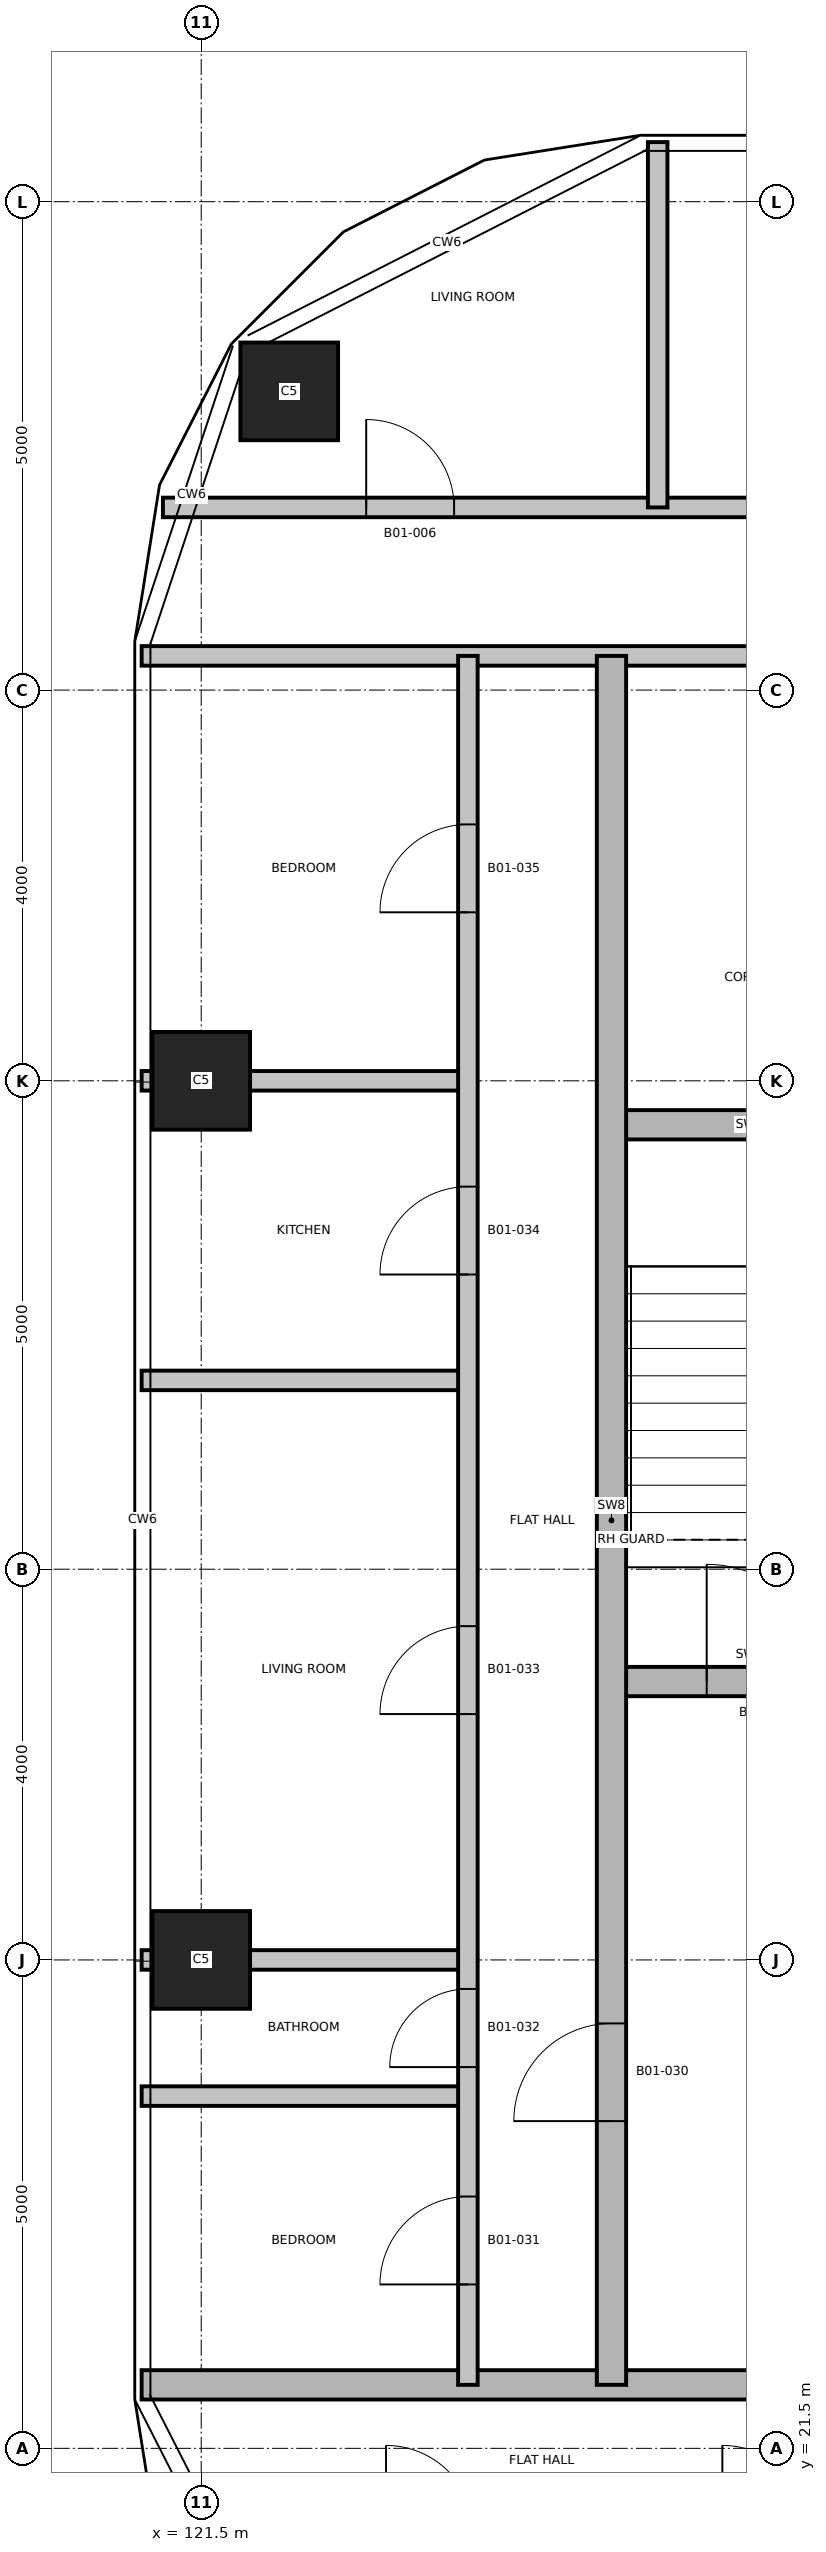
"""IFC4 building model, lengths in metres.
Left out: names, types, materials, properties, quantities, classifications, styles, units other than length and angle.
Written with IfcOpenShell. Run it as: python <this file> out.ifc"""

import sys

from ifc_helpers import new_model, si_unit, direction, frame, frame_2d, origin, origin_2d, place, context, subcontext, project, spatial, rectangle, extrude, element, fill, save


model = new_model("IFC4")
c1 = context("Model", 3, precision=1e-05, world=origin(), true_north=direction((0.0, 1.0)))
c2 = subcontext(c1, "Body", "Model", "MODEL_VIEW")
j1 = project(units=[si_unit("LENGTHUNIT", "METRE"), si_unit("PLANEANGLEUNIT", "RADIAN")], contexts=[c1])
p1 = place(None, origin())
s1 = spatial("IfcSite", under=j1, at=p1, CompositionType="ELEMENT")
p2 = place(p1, origin())
s2 = spatial("IfcBuilding", under=s1, at=p2, CompositionType="ELEMENT")
p3 = place(p2, frame((0.0, 0.0, 37.2)))
s3 = spatial("IfcBuildingStorey", under=s2, at=p3, CompositionType="ELEMENT", Elevation=37.2)
for number, where, z_axis, x_axis in (
    (1, (121.5, 26.5, 0.0), (0.0, 0.0, 1.0), (1.0, 0.0, 0.0)),
    (2, (121.5, 35.5, 0.0), (0.0, 0.0, 1.0), (1.0, 0.0, 0.0)),
    (3, (122.401, 42.558, 0.0), (0.0, 0.0, 1.0), (1.0, 0.0, 0.0)),
):
    element("IfcColumn", number, at=place(p3, frame(where, z_axis=z_axis, x_axis=x_axis)), inside=s3, PredefinedType="COLUMN", context=c2, shape_type="SweptSolid", body=[
        extrude(rectangle(XDim=1.0, YDim=1.0, at=origin_2d()), origin(), (0.0, 0.0, 1.0), 3.7),
    ])
p4 = place(p3, frame((120.89, 22.15, 0.0), z_axis=(0.0, 0.0, 1.0), x_axis=(1.0, 0.0, 0.0)))
e4 = element("IfcWall", 4, at=p4, inside=s3, PredefinedType="SHEAR", context=c2, shape_type="SweptSolid", body=[
    extrude(rectangle(XDim=31.22, YDim=0.3, at=frame_2d((15.61, 0.0))), origin(), (0.0, 0.0, 1.0), 3.4),
])
p5 = place(p4, frame((21.86, 0.0, 0.0)))
e5 = element("IfcOpeningElement", 5, at=p5, cuts=e4, PredefinedType="OPENING", context=c2, shape_type="SweptSolid", body=[
    extrude(rectangle(XDim=1.0, YDim=2.1, at=frame_2d((0.5, 1.05))), frame((0.0, 0.16, 0.0), z_axis=(0.0, -1.0, 0.0), x_axis=(1.0, 0.0, 0.0)), (0.0, 0.0, 1.0), 0.32),
])
p6 = place(p4, frame((6.46, 0.0, 0.0)))
e6 = element("IfcOpeningElement", 6, at=p6, cuts=e4, PredefinedType="OPENING", context=c2, shape_type="SweptSolid", body=[
    extrude(rectangle(XDim=1.0, YDim=2.1, at=frame_2d((0.5, 1.05))), frame((0.0, 0.16, 0.0), z_axis=(0.0, -1.0, 0.0), x_axis=(1.0, 0.0, 0.0)), (0.0, 0.0, 1.0), 0.32),
])
p7 = place(p4, frame((11.36, 0.0, 0.0)))
e7 = element("IfcOpeningElement", 7, at=p7, cuts=e4, PredefinedType="OPENING", context=c2, shape_type="SweptSolid", body=[
    extrude(rectangle(XDim=1.0, YDim=2.1, at=frame_2d((0.5, 1.05))), frame((0.0, 0.16, 0.0), z_axis=(0.0, -1.0, 0.0), x_axis=(1.0, 0.0, 0.0)), (0.0, 0.0, 1.0), 0.32),
])
p8 = place(p4, frame((23.76, 0.0, 0.0)))
e8 = element("IfcOpeningElement", 8, at=p8, cuts=e4, PredefinedType="OPENING", context=c2, shape_type="SweptSolid", body=[
    extrude(rectangle(XDim=1.0, YDim=2.1, at=frame_2d((0.5, 1.05))), frame((0.0, 0.16, 0.0), z_axis=(0.0, -1.0, 0.0), x_axis=(1.0, 0.0, 0.0)), (0.0, 0.0, 1.0), 0.32),
])
p9 = place(p4, frame((15.86, 0.0, 0.0)))
e9 = element("IfcOpeningElement", 9, at=p9, cuts=e4, PredefinedType="OPENING", context=c2, shape_type="SweptSolid", body=[
    extrude(rectangle(XDim=0.9, YDim=2.1, at=frame_2d((0.45, 1.05))), frame((0.0, 0.16, 0.0), z_axis=(0.0, -1.0, 0.0), x_axis=(1.0, 0.0, 0.0)), (0.0, 0.0, 1.0), 0.32),
])
for number, where, z_axis, x_axis in (
    (10, (120.89, 25.106, 0.0), (0.0, 0.0, 1.0), (1.0, 0.0, 0.0)),
    (11, (120.89, 26.5, 0.0), (0.0, 0.0, 1.0), (1.0, 0.0, 0.0)),
):
    element("IfcWall", number, at=place(p3, frame(where, z_axis=z_axis, x_axis=x_axis)), inside=s3, PredefinedType="PARTITIONING", context=c2, shape_type="SweptSolid", body=[
        extrude(rectangle(XDim=3.34, YDim=0.2, at=frame_2d((1.67, 0.0))), origin(), (0.0, 0.0, 1.0), 3.4),
    ])
p10 = place(p3, frame((125.7, 29.35, 0.0), z_axis=(0.0, 0.0, 1.0), x_axis=(1.0, 0.0, 0.0)))
e12 = element("IfcWall", 12, at=p10, inside=s3, PredefinedType="SHEAR", context=c2, shape_type="SweptSolid", body=[
    extrude(rectangle(XDim=2.83, YDim=0.3, at=frame_2d((1.415, 0.0))), origin(), (0.0, 0.0, 1.0), 3.4),
])
p11 = place(p10, frame((0.975, 0.0, 0.0)))
e13 = element("IfcOpeningElement", 13, at=p11, cuts=e12, PredefinedType="OPENING", context=c2, shape_type="SweptSolid", body=[
    extrude(rectangle(XDim=1.2, YDim=2.1, at=frame_2d((0.6, 1.05))), frame((0.0, 0.16, 0.0), z_axis=(0.0, -1.0, 0.0), x_axis=(1.0, 0.0, 0.0)), (0.0, 0.0, 1.0), 0.32),
])
p12 = place(p3, frame((120.89, 32.433, 0.0), z_axis=(0.0, 0.0, 1.0), x_axis=(1.0, 0.0, 0.0)))
e14 = element("IfcWall", 14, at=p12, inside=s3, PredefinedType="PARTITIONING", context=c2, shape_type="SweptSolid", body=[
    extrude(rectangle(XDim=3.34, YDim=0.2, at=frame_2d((1.67, 0.0))), origin(), (0.0, 0.0, 1.0), 3.4),
])
p13 = place(p3, frame((125.7, 35.05, 0.0), z_axis=(0.0, 0.0, 1.0), x_axis=(1.0, 0.0, 0.0)))
e15 = element("IfcWall", 15, at=p13, inside=s3, PredefinedType="SHEAR", context=c2, shape_type="SweptSolid", body=[
    extrude(rectangle(XDim=2.83, YDim=0.3, at=frame_2d((1.415, 0.0))), origin(), (0.0, 0.0, 1.0), 3.4),
])
p14 = place(p3, frame((120.89, 35.5, 0.0), z_axis=(0.0, 0.0, 1.0), x_axis=(1.0, 0.0, 0.0)))
e16 = element("IfcWall", 16, at=p14, inside=s3, PredefinedType="PARTITIONING", context=c2, shape_type="SweptSolid", body=[
    extrude(rectangle(XDim=3.34, YDim=0.2, at=frame_2d((1.67, 0.0))), origin(), (0.0, 0.0, 1.0), 3.4),
])
p15 = place(p3, frame((120.89, 39.85, 0.0), z_axis=(0.0, 0.0, 1.0), x_axis=(1.0, 0.0, 0.0)))
e17 = element("IfcWall", 17, at=p15, inside=s3, PredefinedType="PARTITIONING", context=c2, shape_type="SweptSolid", body=[
    extrude(rectangle(XDim=31.22, YDim=0.2, at=frame_2d((15.61, 0.0))), origin(), (0.0, 0.0, 1.0), 3.4),
])
p16 = place(p15, frame((10.21, 0.0, 0.0)))
e18 = element("IfcOpeningElement", 18, at=p16, cuts=e17, PredefinedType="OPENING", context=c2, shape_type="SweptSolid", body=[
    extrude(rectangle(XDim=1.0, YDim=2.1, at=frame_2d((0.5, 1.05))), frame((0.0, 0.11, 0.0), z_axis=(0.0, -1.0, 0.0), x_axis=(1.0, 0.0, 0.0)), (0.0, 0.0, 1.0), 0.22),
])
p17 = place(p15, frame((20.01, 0.0, 0.0)))
e19 = element("IfcOpeningElement", 19, at=p17, cuts=e17, PredefinedType="OPENING", context=c2, shape_type="SweptSolid", body=[
    extrude(rectangle(XDim=1.0, YDim=2.1, at=frame_2d((0.5, 1.05))), frame((0.0, 0.11, 0.0), z_axis=(0.0, -1.0, 0.0), x_axis=(1.0, 0.0, 0.0)), (0.0, 0.0, 1.0), 0.22),
])
p18 = place(p3, frame((121.108, 41.37, 0.0), z_axis=(0.0, 0.0, 1.0), x_axis=(1.0, 0.0, 0.0)))
e20 = element("IfcWall", 20, at=p18, inside=s3, PredefinedType="PARTITIONING", context=c2, shape_type="SweptSolid", body=[
    extrude(rectangle(XDim=30.784, YDim=0.2, at=frame_2d((15.392, 0.0))), origin(), (0.0, 0.0, 1.0), 3.4),
])
p19 = place(p18, frame((2.081, 0.0, 0.0)))
e21 = element("IfcOpeningElement", 21, at=p19, cuts=e20, PredefinedType="OPENING", context=c2, shape_type="SweptSolid", body=[
    extrude(rectangle(XDim=0.9, YDim=2.1, at=frame_2d((0.45, 1.05))), frame((0.0, 0.11, 0.0), z_axis=(0.0, -1.0, 0.0), x_axis=(1.0, 0.0, 0.0)), (0.0, 0.0, 1.0), 0.22),
])
p20 = place(p18, frame((6.029, 0.0, 0.0)))
e22 = element("IfcOpeningElement", 22, at=p20, cuts=e20, PredefinedType="OPENING", context=c2, shape_type="SweptSolid", body=[
    extrude(rectangle(XDim=0.9, YDim=2.1, at=frame_2d((0.45, 1.05))), frame((0.0, 0.11, 0.0), z_axis=(0.0, -1.0, 0.0), x_axis=(1.0, 0.0, 0.0)), (0.0, 0.0, 1.0), 0.22),
])
p21 = place(p18, frame((9.976, 0.0, 0.0)))
e23 = element("IfcOpeningElement", 23, at=p21, cuts=e20, PredefinedType="OPENING", context=c2, shape_type="SweptSolid", body=[
    extrude(rectangle(XDim=0.9, YDim=2.1, at=frame_2d((0.45, 1.05))), frame((0.0, 0.11, 0.0), z_axis=(0.0, -1.0, 0.0), x_axis=(1.0, 0.0, 0.0)), (0.0, 0.0, 1.0), 0.22),
])
p22 = place(p18, frame((13.776, 0.0, 0.0)))
e24 = element("IfcOpeningElement", 24, at=p22, cuts=e20, PredefinedType="OPENING", context=c2, shape_type="SweptSolid", body=[
    extrude(rectangle(XDim=0.8, YDim=2.1, at=frame_2d((0.4, 1.05))), frame((0.0, 0.11, 0.0), z_axis=(0.0, -1.0, 0.0), x_axis=(1.0, 0.0, 0.0)), (0.0, 0.0, 1.0), 0.22),
])
p23 = place(p18, frame((17.409, 0.0, 0.0)))
e25 = element("IfcOpeningElement", 25, at=p23, cuts=e20, PredefinedType="OPENING", context=c2, shape_type="SweptSolid", body=[
    extrude(rectangle(XDim=0.9, YDim=2.1, at=frame_2d((0.45, 1.05))), frame((0.0, 0.11, 0.0), z_axis=(0.0, -1.0, 0.0), x_axis=(1.0, 0.0, 0.0)), (0.0, 0.0, 1.0), 0.22),
])
p24 = place(p18, frame((21.159, 0.0, 0.0)))
e26 = element("IfcOpeningElement", 26, at=p24, cuts=e20, PredefinedType="OPENING", context=c2, shape_type="SweptSolid", body=[
    extrude(rectangle(XDim=0.9, YDim=2.1, at=frame_2d((0.45, 1.05))), frame((0.0, 0.11, 0.0), z_axis=(0.0, -1.0, 0.0), x_axis=(1.0, 0.0, 0.0)), (0.0, 0.0, 1.0), 0.22),
])
p25 = place(p18, frame((23.219, 0.0, 0.0)))
e27 = element("IfcOpeningElement", 27, at=p25, cuts=e20, PredefinedType="OPENING", context=c2, shape_type="SweptSolid", body=[
    extrude(rectangle(XDim=0.8, YDim=2.1, at=frame_2d((0.4, 1.05))), frame((0.0, 0.11, 0.0), z_axis=(0.0, -1.0, 0.0), x_axis=(1.0, 0.0, 0.0)), (0.0, 0.0, 1.0), 0.22),
])
p26 = place(p18, frame((25.25, 0.0, 0.0)))
e28 = element("IfcOpeningElement", 28, at=p26, cuts=e20, PredefinedType="OPENING", context=c2, shape_type="SweptSolid", body=[
    extrude(rectangle(XDim=0.9, YDim=2.1, at=frame_2d((0.45, 1.05))), frame((0.0, 0.11, 0.0), z_axis=(0.0, -1.0, 0.0), x_axis=(1.0, 0.0, 0.0)), (0.0, 0.0, 1.0), 0.22),
])
p27 = place(p18, frame((27.97, 0.0, 0.0)))
e29 = element("IfcOpeningElement", 29, at=p27, cuts=e20, PredefinedType="OPENING", context=c2, shape_type="SweptSolid", body=[
    extrude(rectangle(XDim=0.9, YDim=2.1, at=frame_2d((0.45, 1.05))), frame((0.0, 0.11, 0.0), z_axis=(0.0, -1.0, 0.0), x_axis=(1.0, 0.0, 0.0)), (0.0, 0.0, 1.0), 0.22),
])
p28 = place(p3, frame((124.23, 22.15, 0.0), z_axis=(0.0, 0.0, 1.0), x_axis=(0.0, 1.0, 0.0)))
e30 = element("IfcWall", 30, at=p28, inside=s3, PredefinedType="PARTITIONING", context=c2, shape_type="SweptSolid", body=[
    extrude(rectangle(XDim=17.7, YDim=0.2, at=frame_2d((8.85, 0.0))), origin(), (0.0, 0.0, 1.0), 3.4),
])
p29 = place(p28, frame((1.028, 0.0, 0.0)))
e31 = element("IfcOpeningElement", 31, at=p29, cuts=e30, PredefinedType="OPENING", context=c2, shape_type="SweptSolid", body=[
    extrude(rectangle(XDim=0.9, YDim=2.1, at=frame_2d((0.45, 1.05))), frame((0.0, 0.11, 0.0), z_axis=(0.0, -1.0, 0.0), x_axis=(1.0, 0.0, 0.0)), (0.0, 0.0, 1.0), 0.22),
])
p30 = place(p28, frame((3.253, 0.0, 0.0)))
e32 = element("IfcOpeningElement", 32, at=p30, cuts=e30, PredefinedType="OPENING", context=c2, shape_type="SweptSolid", body=[
    extrude(rectangle(XDim=0.8, YDim=2.1, at=frame_2d((0.4, 1.05))), frame((0.0, 0.11, 0.0), z_axis=(0.0, -1.0, 0.0), x_axis=(1.0, 0.0, 0.0)), (0.0, 0.0, 1.0), 0.22),
])
p31 = place(p28, frame((6.867, 0.0, 0.0)))
e33 = element("IfcOpeningElement", 33, at=p31, cuts=e30, PredefinedType="OPENING", context=c2, shape_type="SweptSolid", body=[
    extrude(rectangle(XDim=0.9, YDim=2.1, at=frame_2d((0.45, 1.05))), frame((0.0, 0.11, 0.0), z_axis=(0.0, -1.0, 0.0), x_axis=(1.0, 0.0, 0.0)), (0.0, 0.0, 1.0), 0.22),
])
p32 = place(p28, frame((11.367, 0.0, 0.0)))
e34 = element("IfcOpeningElement", 34, at=p32, cuts=e30, PredefinedType="OPENING", context=c2, shape_type="SweptSolid", body=[
    extrude(rectangle(XDim=0.9, YDim=2.1, at=frame_2d((0.45, 1.05))), frame((0.0, 0.11, 0.0), z_axis=(0.0, -1.0, 0.0), x_axis=(1.0, 0.0, 0.0)), (0.0, 0.0, 1.0), 0.22),
])
p33 = place(p28, frame((15.075, 0.0, 0.0)))
e35 = element("IfcOpeningElement", 35, at=p33, cuts=e30, PredefinedType="OPENING", context=c2, shape_type="SweptSolid", body=[
    extrude(rectangle(XDim=0.9, YDim=2.1, at=frame_2d((0.45, 1.05))), frame((0.0, 0.11, 0.0), z_axis=(0.0, -1.0, 0.0), x_axis=(1.0, 0.0, 0.0)), (0.0, 0.0, 1.0), 0.22),
])
p34 = place(p3, frame((125.7, 22.15, 0.0), z_axis=(0.0, 0.0, 1.0), x_axis=(0.0, 1.0, 0.0)))
e36 = element("IfcWall", 36, at=p34, inside=s3, PredefinedType="SHEAR", context=c2, shape_type="SweptSolid", body=[
    extrude(rectangle(XDim=17.7, YDim=0.3, at=frame_2d((8.85, 0.0))), origin(), (0.0, 0.0, 1.0), 3.4),
])
p35 = place(p34, frame((2.7, 0.0, 0.0)))
e37 = element("IfcOpeningElement", 37, at=p35, cuts=e36, PredefinedType="OPENING", context=c2, shape_type="SweptSolid", body=[
    extrude(rectangle(XDim=1.0, YDim=2.1, at=frame_2d((0.5, 1.05))), frame((0.0, 0.16, 0.0), z_axis=(0.0, -1.0, 0.0), x_axis=(1.0, 0.0, 0.0)), (0.0, 0.0, 1.0), 0.32),
])
p36 = place(p3, frame((126.173, 41.37, 0.0), z_axis=(0.0, 0.0, 1.0), x_axis=(0.0, 1.0, 0.0)))
e38 = element("IfcWall", 38, at=p36, inside=s3, PredefinedType="PARTITIONING", context=c2, shape_type="SweptSolid", body=[
    extrude(rectangle(XDim=3.74, YDim=0.2, at=frame_2d((1.87, 0.0))), origin(), (0.0, 0.0, 1.0), 3.4),
])
p37 = place(p11, origin())
e39 = element("IfcDoor", 39, at=p37, inside=s3, OperationType="SINGLE_SWING_RIGHT", PredefinedType="DOOR", context=c2, shape_type="SweptSolid", body=[
    extrude(rectangle(XDim=1.2, YDim=2.1, at=frame_2d((0.6, 1.05))), frame((0.0, 0.025, 0.0), z_axis=(0.0, -1.0, 0.0), x_axis=(1.0, 0.0, 0.0)), (0.0, 0.0, 1.0), 0.05),
])
fill(e13, e39)
p38 = place(p19, origin())
e40 = element("IfcDoor", 40, at=p38, inside=s3, OperationType="SINGLE_SWING_RIGHT", PredefinedType="DOOR", context=c2, shape_type="SweptSolid", body=[
    extrude(rectangle(XDim=0.9, YDim=2.1, at=frame_2d((0.45, 1.05))), frame((0.0, 0.025, 0.0), z_axis=(0.0, -1.0, 0.0), x_axis=(1.0, 0.0, 0.0)), (0.0, 0.0, 1.0), 0.05),
])
fill(e21, e40)
p39 = place(p35, origin())
e41 = element("IfcDoor", 41, at=p39, inside=s3, OperationType="SINGLE_SWING_RIGHT", PredefinedType="DOOR", context=c2, shape_type="SweptSolid", body=[
    extrude(rectangle(XDim=1.0, YDim=2.1, at=frame_2d((0.5, 1.05))), frame((0.0, 0.025, 0.0), z_axis=(0.0, -1.0, 0.0), x_axis=(1.0, 0.0, 0.0)), (0.0, 0.0, 1.0), 0.05),
])
fill(e37, e41)
p40 = place(p29, origin())
e42 = element("IfcDoor", 42, at=p40, inside=s3, OperationType="SINGLE_SWING_LEFT", PredefinedType="DOOR", context=c2, shape_type="SweptSolid", body=[
    extrude(rectangle(XDim=0.9, YDim=2.1, at=frame_2d((0.45, 1.05))), frame((0.0, 0.025, 0.0), z_axis=(0.0, -1.0, 0.0), x_axis=(1.0, 0.0, 0.0)), (0.0, 0.0, 1.0), 0.05),
])
fill(e31, e42)
p41 = place(p30, origin())
e43 = element("IfcDoor", 43, at=p41, inside=s3, OperationType="SINGLE_SWING_RIGHT", PredefinedType="DOOR", context=c2, shape_type="SweptSolid", body=[
    extrude(rectangle(XDim=0.8, YDim=2.1, at=frame_2d((0.4, 1.05))), frame((0.0, 0.025, 0.0), z_axis=(0.0, -1.0, 0.0), x_axis=(1.0, 0.0, 0.0)), (0.0, 0.0, 1.0), 0.05),
])
fill(e32, e43)
p42 = place(p31, origin())
e44 = element("IfcDoor", 44, at=p42, inside=s3, OperationType="SINGLE_SWING_LEFT", PredefinedType="DOOR", context=c2, shape_type="SweptSolid", body=[
    extrude(rectangle(XDim=0.9, YDim=2.1, at=frame_2d((0.45, 1.05))), frame((0.0, 0.025, 0.0), z_axis=(0.0, -1.0, 0.0), x_axis=(1.0, 0.0, 0.0)), (0.0, 0.0, 1.0), 0.05),
])
fill(e33, e44)
p43 = place(p32, origin())
e45 = element("IfcDoor", 45, at=p43, inside=s3, OperationType="SINGLE_SWING_RIGHT", PredefinedType="DOOR", context=c2, shape_type="SweptSolid", body=[
    extrude(rectangle(XDim=0.9, YDim=2.1, at=frame_2d((0.45, 1.05))), frame((0.0, 0.025, 0.0), z_axis=(0.0, -1.0, 0.0), x_axis=(1.0, 0.0, 0.0)), (0.0, 0.0, 1.0), 0.05),
])
fill(e34, e45)
p44 = place(p33, origin())
e46 = element("IfcDoor", 46, at=p44, inside=s3, OperationType="SINGLE_SWING_LEFT", PredefinedType="DOOR", context=c2, shape_type="SweptSolid", body=[
    extrude(rectangle(XDim=0.9, YDim=2.1, at=frame_2d((0.45, 1.05))), frame((0.0, 0.025, 0.0), z_axis=(0.0, -1.0, 0.0), x_axis=(1.0, 0.0, 0.0)), (0.0, 0.0, 1.0), 0.05),
])
fill(e35, e46)
save(model, sys.argv[1])
